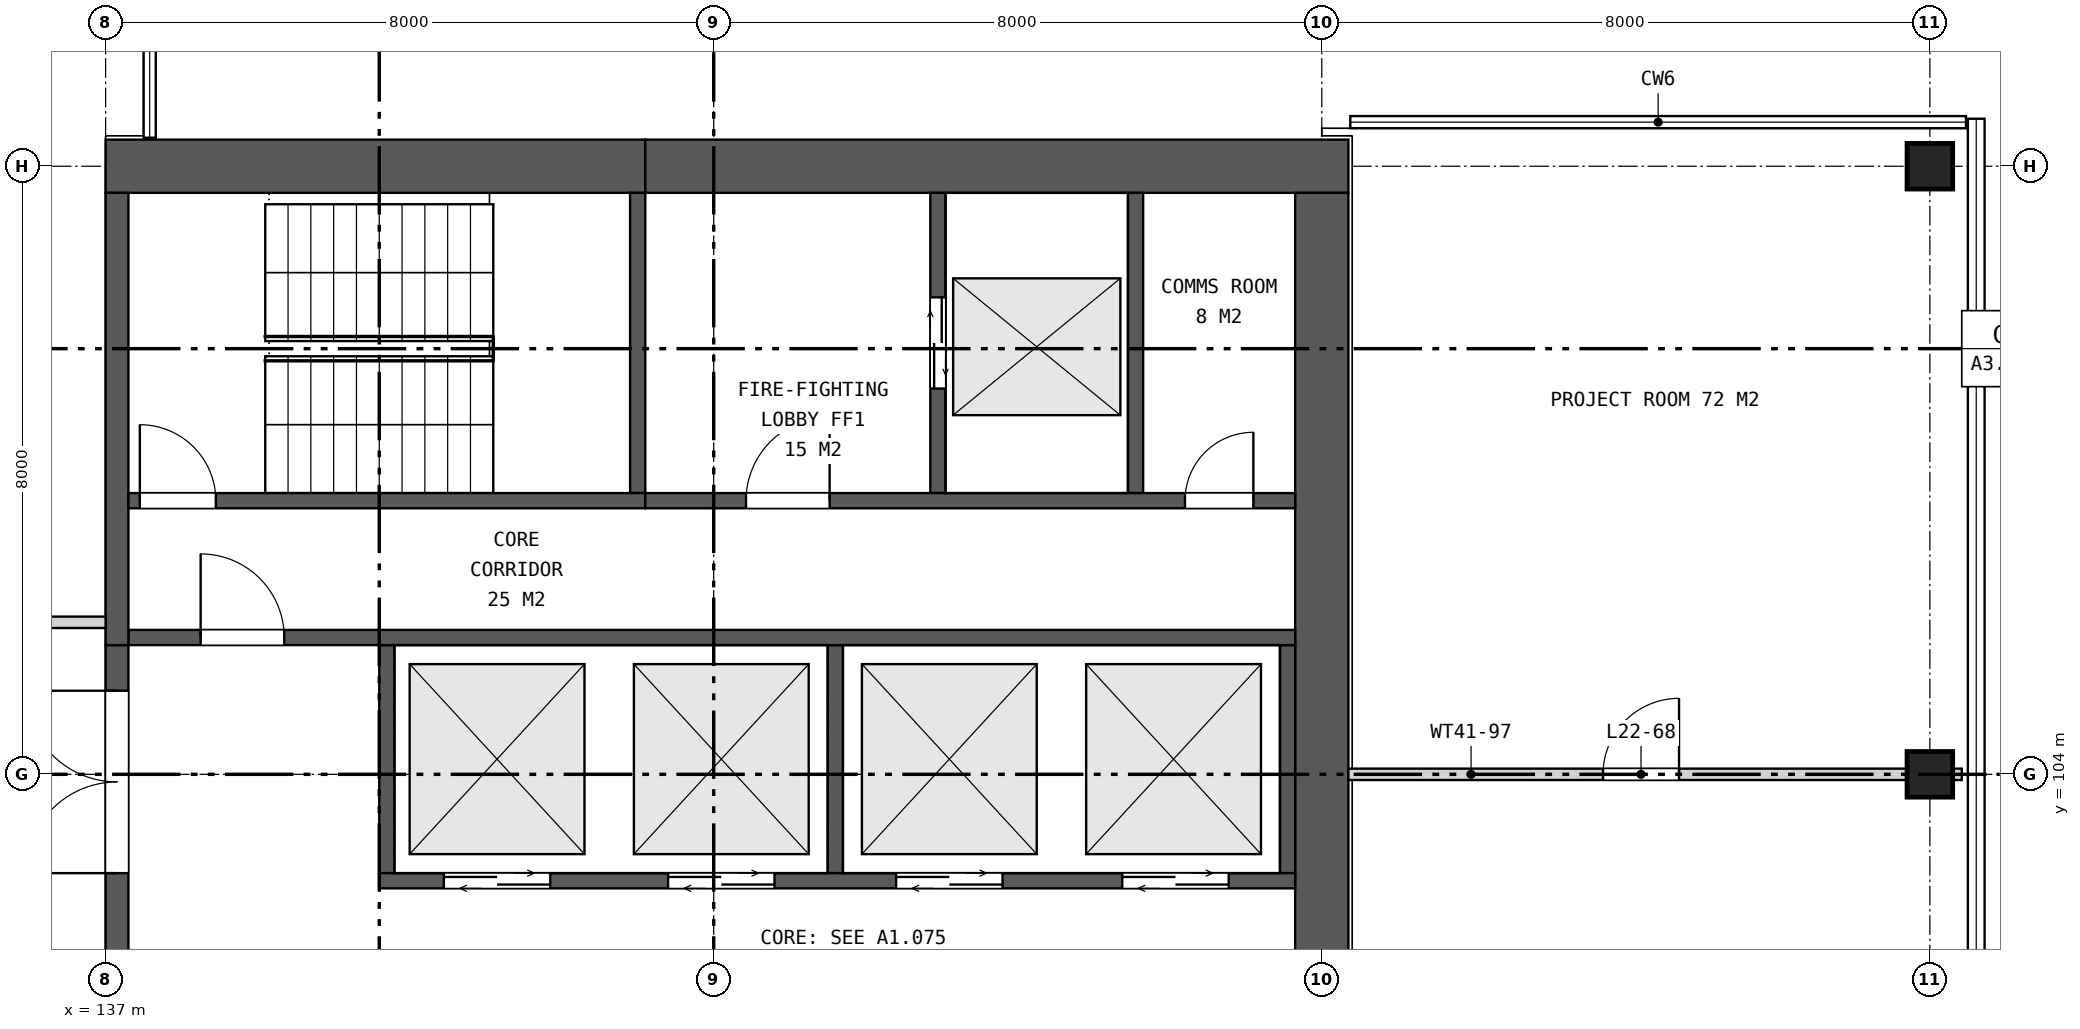
"""IFC4 building model, lengths in metres.
Left out: names, types, materials, properties, quantities, classifications, styles, units other than length and angle.
Written with IfcOpenShell. Run it as: python <this file> out.ifc"""

import sys

from ifc_helpers import new_model, si_unit, direction, frame, frame_2d, origin, origin_2d, place, context, subcontext, project, spatial, rectangle, extrude, element, fill, save


model = new_model("IFC4")
c1 = context("Model", 3, precision=1e-05, world=origin(), true_north=direction((0.0, 1.0)))
c2 = subcontext(c1, "Body", "Model", "MODEL_VIEW")
j1 = project(units=[si_unit("LENGTHUNIT", "METRE"), si_unit("PLANEANGLEUNIT", "RADIAN")], contexts=[c1])
p1 = place(None, origin())
s1 = spatial("IfcSite", under=j1, at=p1, CompositionType="ELEMENT")
p2 = place(p1, origin())
s2 = spatial("IfcBuilding", under=s1, at=p2, CompositionType="ELEMENT")
p3 = place(p2, frame((0.0, 0.0, 112.7)))
s3 = spatial("IfcBuildingStorey", under=s2, at=p3, CompositionType="ELEMENT", Elevation=112.7)
for number, where, z_axis, x_axis in (
    (1, (161.0, 104.0, 0.0), (0.0, 0.0, 1.0), (1.0, 0.0, 0.0)),
    (2, (161.0, 112.0, 0.0), (0.0, 0.0, 1.0), (1.0, 0.0, 0.0)),
):
    element("IfcColumn", number, at=place(p3, frame(where, z_axis=z_axis, x_axis=x_axis)), inside=s3, PredefinedType="COLUMN", context=c2, shape_type="SweptSolid", body=[
        extrude(rectangle(XDim=0.6, YDim=0.6, at=origin_2d()), origin(), (0.0, 0.0, 1.0), 4.2),
    ])
p4 = place(p3, frame((137.0, 112.0, 0.0), z_axis=(0.0, 0.0, 1.0), x_axis=(1.0, 0.0, 0.0)))
e3 = element("IfcWall", 3, at=p4, inside=s3, PredefinedType="SHEAR", context=c2, shape_type="SweptSolid", body=[
    extrude(rectangle(XDim=7.1, YDim=0.7, at=frame_2d((3.55, 0.0))), origin(), (0.0, 0.0, 1.0), 4.2),
])
p5 = place(p3, frame((144.1, 112.0, 0.0), z_axis=(0.0, 0.0, 1.0), x_axis=(1.0, 0.0, 0.0)))
e4 = element("IfcWall", 4, at=p5, inside=s3, PredefinedType="SHEAR", context=c2, shape_type="SweptSolid", body=[
    extrude(rectangle(XDim=9.25, YDim=0.7, at=frame_2d((4.625, 0.0))), origin(), (0.0, 0.0, 1.0), 4.2),
])
p6 = place(p3, frame((153.0, 88.35, 0.0), z_axis=(0.0, 0.0, 1.0), x_axis=(0.0, 1.0, 0.0)))
e5 = element("IfcWall", 5, at=p6, inside=s3, PredefinedType="SHEAR", context=c2, shape_type="SweptSolid", body=[
    extrude(rectangle(XDim=23.3, YDim=0.7, at=frame_2d((11.65, 0.0))), origin(), (0.0, 0.0, 1.0), 4.2),
])
p7 = place(p6, frame((10.45, 0.0, 0.0)))
e6 = element("IfcOpeningElement", 6, at=p7, cuts=e5, PredefinedType="OPENING", context=c2, shape_type="SweptSolid", body=[
    extrude(rectangle(XDim=2.4, YDim=2.4, at=frame_2d((1.2, 1.2))), frame((0.0, 0.36, 0.0), z_axis=(0.0, -1.0, 0.0), x_axis=(1.0, 0.0, 0.0)), (0.0, 0.0, 1.0), 0.72),
])
p8 = place(p3, frame((137.15, 94.3, 0.0), z_axis=(0.0, 0.0, 1.0), x_axis=(0.0, 1.0, 0.0)))
e7 = element("IfcWall", 7, at=p8, inside=s3, PredefinedType="SHEAR", context=c2, shape_type="SweptSolid", body=[
    extrude(rectangle(XDim=11.4, YDim=0.3, at=frame_2d((5.7, 0.0))), origin(), (0.0, 0.0, 1.0), 4.2),
])
p9 = place(p8, frame((0.6, 0.0, 0.0)))
e8 = element("IfcOpeningElement", 8, at=p9, cuts=e7, PredefinedType="OPENING", context=c2, shape_type="SweptSolid", body=[
    extrude(rectangle(XDim=2.4, YDim=2.4, at=frame_2d((1.2, 1.2))), frame((0.0, 0.16, 0.0), z_axis=(0.0, -1.0, 0.0), x_axis=(1.0, 0.0, 0.0)), (0.0, 0.0, 1.0), 0.32),
])
p10 = place(p8, frame((4.5, 0.0, 0.0)))
e9 = element("IfcOpeningElement", 9, at=p10, cuts=e7, PredefinedType="OPENING", context=c2, shape_type="SweptSolid", body=[
    extrude(rectangle(XDim=2.4, YDim=2.4, at=frame_2d((1.2, 1.2))), frame((0.0, 0.16, 0.0), z_axis=(0.0, -1.0, 0.0), x_axis=(1.0, 0.0, 0.0)), (0.0, 0.0, 1.0), 0.32),
])
p11 = place(p8, frame((8.4, 0.0, 0.0)))
e10 = element("IfcOpeningElement", 10, at=p11, cuts=e7, PredefinedType="OPENING", context=c2, shape_type="SweptSolid", body=[
    extrude(rectangle(XDim=2.4, YDim=2.4, at=frame_2d((1.2, 1.2))), frame((0.0, 0.16, 0.0), z_axis=(0.0, -1.0, 0.0), x_axis=(1.0, 0.0, 0.0)), (0.0, 0.0, 1.0), 0.32),
])
for number, where, z_axis, x_axis in (
    (11, (140.7, 102.7, 0.0), (0.0, 0.0, 1.0), (0.0, 1.0, 0.0)),
    (12, (146.6, 102.7, 0.0), (0.0, 0.0, 1.0), (0.0, 1.0, 0.0)),
    (13, (152.55, 102.7, 0.0), (0.0, 0.0, 1.0), (0.0, 1.0, 0.0)),
):
    element("IfcWall", number, at=place(p3, frame(where, z_axis=z_axis, x_axis=x_axis)), inside=s3, PredefinedType="SHEAR", context=c2, shape_type="SweptSolid", body=[
        extrude(rectangle(XDim=3.0, YDim=0.2, at=frame_2d((1.5, 0.0))), origin(), (0.0, 0.0, 1.0), 4.2),
    ])
p12 = place(p3, frame((140.6, 102.6, 0.0), z_axis=(0.0, 0.0, 1.0), x_axis=(1.0, 0.0, 0.0)))
e14 = element("IfcWall", 14, at=p12, inside=s3, PredefinedType="SHEAR", context=c2, shape_type="SweptSolid", body=[
    extrude(rectangle(XDim=12.05, YDim=0.2, at=frame_2d((6.025, 0.0))), origin(), (0.0, 0.0, 1.0), 4.2),
])
p13 = place(p12, frame((0.85, 0.0, 0.0)))
e15 = element("IfcOpeningElement", 15, at=p13, cuts=e14, PredefinedType="OPENING", context=c2, shape_type="SweptSolid", body=[
    extrude(rectangle(XDim=1.4, YDim=2.1, at=frame_2d((0.7, 1.05))), frame((0.0, 0.11, 0.0), z_axis=(0.0, -1.0, 0.0), x_axis=(1.0, 0.0, 0.0)), (0.0, 0.0, 1.0), 0.22),
])
p14 = place(p12, frame((3.8, 0.0, 0.0)))
e16 = element("IfcOpeningElement", 16, at=p14, cuts=e14, PredefinedType="OPENING", context=c2, shape_type="SweptSolid", body=[
    extrude(rectangle(XDim=1.4, YDim=2.1, at=frame_2d((0.7, 1.05))), frame((0.0, 0.11, 0.0), z_axis=(0.0, -1.0, 0.0), x_axis=(1.0, 0.0, 0.0)), (0.0, 0.0, 1.0), 0.22),
])
p15 = place(p12, frame((6.8, 0.0, 0.0)))
e17 = element("IfcOpeningElement", 17, at=p15, cuts=e14, PredefinedType="OPENING", context=c2, shape_type="SweptSolid", body=[
    extrude(rectangle(XDim=1.4, YDim=2.1, at=frame_2d((0.7, 1.05))), frame((0.0, 0.11, 0.0), z_axis=(0.0, -1.0, 0.0), x_axis=(1.0, 0.0, 0.0)), (0.0, 0.0, 1.0), 0.22),
])
p16 = place(p12, frame((9.775, 0.0, 0.0)))
e18 = element("IfcOpeningElement", 18, at=p16, cuts=e14, PredefinedType="OPENING", context=c2, shape_type="SweptSolid", body=[
    extrude(rectangle(XDim=1.4, YDim=2.1, at=frame_2d((0.7, 1.05))), frame((0.0, 0.11, 0.0), z_axis=(0.0, -1.0, 0.0), x_axis=(1.0, 0.0, 0.0)), (0.0, 0.0, 1.0), 0.22),
])
p17 = place(p3, frame((137.3, 105.8, 0.0), z_axis=(0.0, 0.0, 1.0), x_axis=(1.0, 0.0, 0.0)))
e19 = element("IfcWall", 19, at=p17, inside=s3, PredefinedType="SHEAR", context=c2, shape_type="SweptSolid", body=[
    extrude(rectangle(XDim=15.35, YDim=0.2, at=frame_2d((7.675, 0.0))), origin(), (0.0, 0.0, 1.0), 4.2),
])
p18 = place(p17, frame((0.95, 0.0, 0.0)))
e20 = element("IfcOpeningElement", 20, at=p18, cuts=e19, PredefinedType="OPENING", context=c2, shape_type="SweptSolid", body=[
    extrude(rectangle(XDim=1.1, YDim=2.1, at=frame_2d((0.55, 1.05))), frame((0.0, 0.11, 0.0), z_axis=(0.0, -1.0, 0.0), x_axis=(1.0, 0.0, 0.0)), (0.0, 0.0, 1.0), 0.22),
])
p19 = place(p3, frame((137.15, 105.7, 0.0), z_axis=(0.0, 0.0, 1.0), x_axis=(0.0, 1.0, 0.0)))
e21 = element("IfcWall", 21, at=p19, inside=s3, PredefinedType="SHEAR", context=c2, shape_type="SweptSolid", body=[
    extrude(rectangle(XDim=5.95, YDim=0.3, at=frame_2d((2.975, 0.0))), origin(), (0.0, 0.0, 1.0), 4.2),
])
p20 = place(p3, frame((144.0, 107.7, 0.0), z_axis=(0.0, 0.0, 1.0), x_axis=(0.0, 1.0, 0.0)))
e22 = element("IfcWall", 22, at=p20, inside=s3, PredefinedType="SHEAR", context=c2, shape_type="SweptSolid", body=[
    extrude(rectangle(XDim=3.95, YDim=0.2, at=frame_2d((1.975, 0.0))), origin(), (0.0, 0.0, 1.0), 4.2),
])
p21 = place(p3, frame((147.95, 107.7, 0.0), z_axis=(0.0, 0.0, 1.0), x_axis=(0.0, 1.0, 0.0)))
e23 = element("IfcWall", 23, at=p21, inside=s3, PredefinedType="SHEAR", context=c2, shape_type="SweptSolid", body=[
    extrude(rectangle(XDim=3.95, YDim=0.2, at=frame_2d((1.975, 0.0))), origin(), (0.0, 0.0, 1.0), 4.2),
])
p22 = place(p21, frame((1.375, 0.0, 0.0)))
e24 = element("IfcOpeningElement", 24, at=p22, cuts=e23, PredefinedType="OPENING", context=c2, shape_type="SweptSolid", body=[
    extrude(rectangle(XDim=1.2, YDim=2.1, at=frame_2d((0.6, 1.05))), frame((0.0, 0.11, 0.0), z_axis=(0.0, -1.0, 0.0), x_axis=(1.0, 0.0, 0.0)), (0.0, 0.0, 1.0), 0.22),
])
p23 = place(p3, frame((150.55, 107.7, 0.0), z_axis=(0.0, 0.0, 1.0), x_axis=(0.0, 1.0, 0.0)))
e25 = element("IfcWall", 25, at=p23, inside=s3, PredefinedType="SHEAR", context=c2, shape_type="SweptSolid", body=[
    extrude(rectangle(XDim=3.95, YDim=0.2, at=frame_2d((1.975, 0.0))), origin(), (0.0, 0.0, 1.0), 4.2),
])
p24 = place(p3, frame((137.3, 107.6, 0.0), z_axis=(0.0, 0.0, 1.0), x_axis=(1.0, 0.0, 0.0)))
e26 = element("IfcWall", 26, at=p24, inside=s3, PredefinedType="SHEAR", context=c2, shape_type="SweptSolid", body=[
    extrude(rectangle(XDim=6.8, YDim=0.2, at=frame_2d((3.4, 0.0))), origin(), (0.0, 0.0, 1.0), 4.2),
])
p25 = place(p24, frame((0.15, 0.0, 0.0)))
e27 = element("IfcOpeningElement", 27, at=p25, cuts=e26, PredefinedType="OPENING", context=c2, shape_type="SweptSolid", body=[
    extrude(rectangle(XDim=1.0, YDim=2.1, at=frame_2d((0.5, 1.05))), frame((0.0, 0.11, 0.0), z_axis=(0.0, -1.0, 0.0), x_axis=(1.0, 0.0, 0.0)), (0.0, 0.0, 1.0), 0.22),
])
p26 = place(p3, frame((144.1, 107.6, 0.0), z_axis=(0.0, 0.0, 1.0), x_axis=(1.0, 0.0, 0.0)))
e28 = element("IfcWall", 28, at=p26, inside=s3, PredefinedType="SHEAR", context=c2, shape_type="SweptSolid", body=[
    extrude(rectangle(XDim=8.55, YDim=0.2, at=frame_2d((4.275, 0.0))), origin(), (0.0, 0.0, 1.0), 4.2),
])
p27 = place(p26, frame((1.325, 0.0, 0.0)))
e29 = element("IfcOpeningElement", 29, at=p27, cuts=e28, PredefinedType="OPENING", context=c2, shape_type="SweptSolid", body=[
    extrude(rectangle(XDim=1.1, YDim=2.1, at=frame_2d((0.55, 1.05))), frame((0.0, 0.11, 0.0), z_axis=(0.0, -1.0, 0.0), x_axis=(1.0, 0.0, 0.0)), (0.0, 0.0, 1.0), 0.22),
])
p28 = place(p26, frame((7.1, 0.0, 0.0)))
e30 = element("IfcOpeningElement", 30, at=p28, cuts=e28, PredefinedType="OPENING", context=c2, shape_type="SweptSolid", body=[
    extrude(rectangle(XDim=0.9, YDim=2.1, at=frame_2d((0.45, 1.05))), frame((0.0, 0.11, 0.0), z_axis=(0.0, -1.0, 0.0), x_axis=(1.0, 0.0, 0.0)), (0.0, 0.0, 1.0), 0.22),
])
p29 = place(p3, frame((153.35, 104.0, 0.0), z_axis=(0.0, 0.0, 1.0), x_axis=(1.0, 0.0, 0.0)))
e31 = element("IfcWall", 31, at=p29, inside=s3, PredefinedType="PARTITIONING", context=c2, shape_type="SweptSolid", body=[
    extrude(rectangle(XDim=8.07, YDim=0.15, at=frame_2d((4.035, 0.0))), origin(), (0.0, 0.0, 1.0), 3.437),
])
p30 = place(p29, frame((3.35, 0.0, 0.0)))
e32 = element("IfcOpeningElement", 32, at=p30, cuts=e31, PredefinedType="OPENING", context=c2, shape_type="SweptSolid", body=[
    extrude(rectangle(XDim=1.0, YDim=2.1, at=frame_2d((0.5, 1.05))), frame((0.0, 0.085, 0.0), z_axis=(0.0, -1.0, 0.0), x_axis=(1.0, 0.0, 0.0)), (0.0, 0.0, 1.0), 0.17),
])
p31 = place(p3, frame((126.275, 106.0, 0.0), z_axis=(0.0, 0.0, 1.0), x_axis=(1.0, 0.0, 0.0)))
e33 = element("IfcWall", 33, at=p31, inside=s3, PredefinedType="PARTITIONING", context=c2, shape_type="SweptSolid", body=[
    extrude(rectangle(XDim=10.725, YDim=0.15, at=frame_2d((5.363, 0.0))), origin(), (0.0, 0.0, 1.0), 3.437),
])
p32 = place(p11, origin())
e34 = element("IfcDoor", 34, at=p32, inside=s3, OperationType="DOUBLE_DOOR_SINGLE_SWING", PredefinedType="DOOR", context=c2, shape_type="SweptSolid", body=[
    extrude(rectangle(XDim=2.4, YDim=2.4, at=frame_2d((1.2, 1.2))), frame((0.0, 0.025, 0.0), z_axis=(0.0, -1.0, 0.0), x_axis=(1.0, 0.0, 0.0)), (0.0, 0.0, 1.0), 0.05),
])
fill(e10, e34)
p33 = place(p13, origin())
e35 = element("IfcDoor", 35, at=p33, inside=s3, OperationType="DOUBLE_DOOR_SLIDING", PredefinedType="DOOR", context=c2, shape_type="SweptSolid", body=[
    extrude(rectangle(XDim=1.4, YDim=2.1, at=frame_2d((0.7, 1.05))), frame((0.0, 0.025, 0.0), z_axis=(0.0, -1.0, 0.0), x_axis=(1.0, 0.0, 0.0)), (0.0, 0.0, 1.0), 0.05),
])
fill(e15, e35)
p34 = place(p14, origin())
e36 = element("IfcDoor", 36, at=p34, inside=s3, OperationType="DOUBLE_DOOR_SLIDING", PredefinedType="DOOR", context=c2, shape_type="SweptSolid", body=[
    extrude(rectangle(XDim=1.4, YDim=2.1, at=frame_2d((0.7, 1.05))), frame((0.0, 0.025, 0.0), z_axis=(0.0, -1.0, 0.0), x_axis=(1.0, 0.0, 0.0)), (0.0, 0.0, 1.0), 0.05),
])
fill(e16, e36)
p35 = place(p15, origin())
e37 = element("IfcDoor", 37, at=p35, inside=s3, OperationType="DOUBLE_DOOR_SLIDING", PredefinedType="DOOR", context=c2, shape_type="SweptSolid", body=[
    extrude(rectangle(XDim=1.4, YDim=2.1, at=frame_2d((0.7, 1.05))), frame((0.0, 0.025, 0.0), z_axis=(0.0, -1.0, 0.0), x_axis=(1.0, 0.0, 0.0)), (0.0, 0.0, 1.0), 0.05),
])
fill(e17, e37)
p36 = place(p16, origin())
e38 = element("IfcDoor", 38, at=p36, inside=s3, OperationType="DOUBLE_DOOR_SLIDING", PredefinedType="DOOR", context=c2, shape_type="SweptSolid", body=[
    extrude(rectangle(XDim=1.4, YDim=2.1, at=frame_2d((0.7, 1.05))), frame((0.0, 0.025, 0.0), z_axis=(0.0, -1.0, 0.0), x_axis=(1.0, 0.0, 0.0)), (0.0, 0.0, 1.0), 0.05),
])
fill(e18, e38)
p37 = place(p18, origin())
e39 = element("IfcDoor", 39, at=p37, inside=s3, OperationType="SINGLE_SWING_LEFT", PredefinedType="DOOR", context=c2, shape_type="SweptSolid", body=[
    extrude(rectangle(XDim=1.1, YDim=2.1, at=frame_2d((0.55, 1.05))), frame((0.0, 0.025, 0.0), z_axis=(0.0, -1.0, 0.0), x_axis=(1.0, 0.0, 0.0)), (0.0, 0.0, 1.0), 0.05),
])
fill(e20, e39)
p38 = place(p22, origin())
e40 = element("IfcDoor", 40, at=p38, inside=s3, OperationType="DOUBLE_DOOR_SLIDING", PredefinedType="DOOR", context=c2, shape_type="SweptSolid", body=[
    extrude(rectangle(XDim=1.2, YDim=2.1, at=frame_2d((0.6, 1.05))), frame((0.0, 0.025, 0.0), z_axis=(0.0, -1.0, 0.0), x_axis=(1.0, 0.0, 0.0)), (0.0, 0.0, 1.0), 0.05),
])
fill(e24, e40)
p39 = place(p25, origin())
e41 = element("IfcDoor", 41, at=p39, inside=s3, OperationType="SINGLE_SWING_LEFT", PredefinedType="DOOR", context=c2, shape_type="SweptSolid", body=[
    extrude(rectangle(XDim=1.0, YDim=2.1, at=frame_2d((0.5, 1.05))), frame((0.0, 0.025, 0.0), z_axis=(0.0, -1.0, 0.0), x_axis=(1.0, 0.0, 0.0)), (0.0, 0.0, 1.0), 0.05),
])
fill(e27, e41)
p40 = place(p27, origin())
e42 = element("IfcDoor", 42, at=p40, inside=s3, OperationType="SINGLE_SWING_RIGHT", PredefinedType="DOOR", context=c2, shape_type="SweptSolid", body=[
    extrude(rectangle(XDim=1.1, YDim=2.1, at=frame_2d((0.55, 1.05))), frame((0.0, 0.025, 0.0), z_axis=(0.0, -1.0, 0.0), x_axis=(1.0, 0.0, 0.0)), (0.0, 0.0, 1.0), 0.05),
])
fill(e29, e42)
p41 = place(p28, origin())
e43 = element("IfcDoor", 43, at=p41, inside=s3, OperationType="SINGLE_SWING_RIGHT", PredefinedType="DOOR", context=c2, shape_type="SweptSolid", body=[
    extrude(rectangle(XDim=0.9, YDim=2.1, at=frame_2d((0.45, 1.05))), frame((0.0, 0.025, 0.0), z_axis=(0.0, -1.0, 0.0), x_axis=(1.0, 0.0, 0.0)), (0.0, 0.0, 1.0), 0.05),
])
fill(e30, e43)
p42 = place(p30, origin())
e44 = element("IfcDoor", 44, at=p42, inside=s3, OperationType="SINGLE_SWING_RIGHT", PredefinedType="DOOR", context=c2, shape_type="SweptSolid", body=[
    extrude(rectangle(XDim=1.0, YDim=2.1, at=frame_2d((0.5, 1.05))), frame((0.0, 0.025, 0.0), z_axis=(0.0, -1.0, 0.0), x_axis=(1.0, 0.0, 0.0)), (0.0, 0.0, 1.0), 0.05),
])
fill(e32, e44)
save(model, sys.argv[1])
